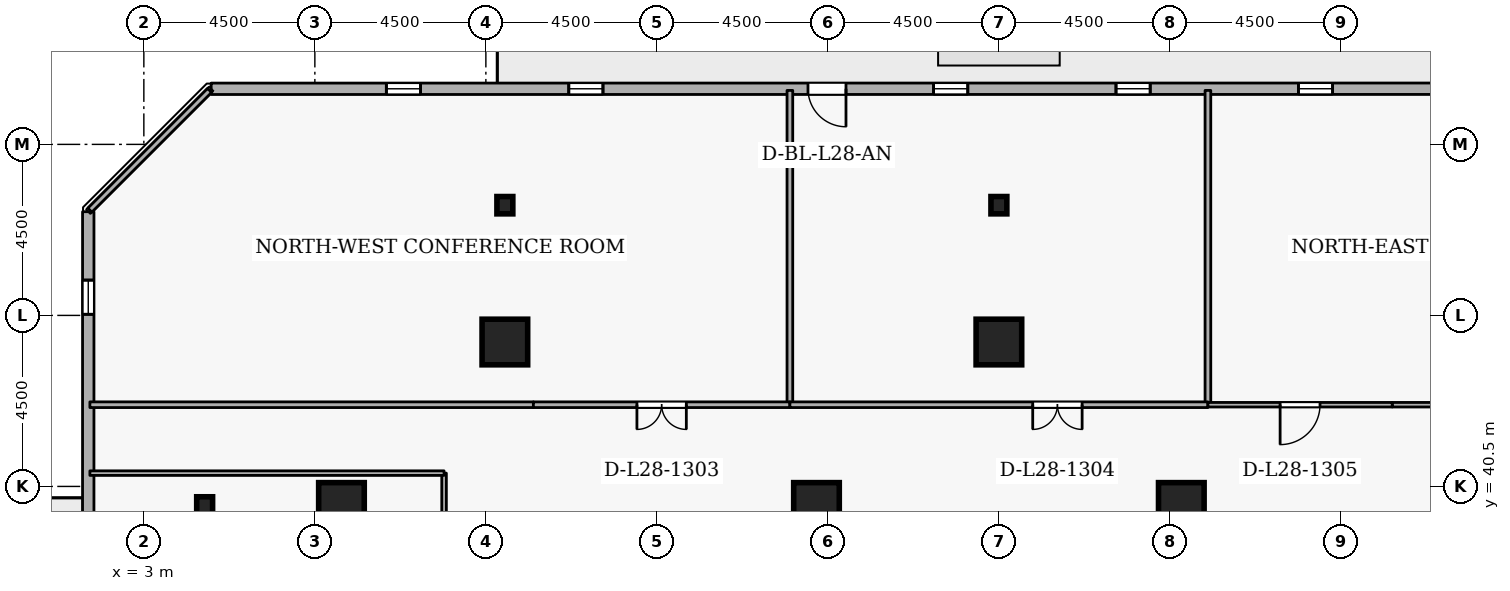
"""IFC4 building model, lengths in metres.
Left out: names, types, materials, properties, quantities, classifications, styles, units other than length and angle.
Written with IfcOpenShell. Run it as: python <this file> out.ifc"""

import sys

from ifc_helpers import new_model, si_unit, direction, frame, frame_2d, origin, origin_2d, place, context, subcontext, project, spatial, rectangle, i_section, extrude, element, fill, save


model = new_model("IFC4")
c1 = context("Model", 3, precision=1e-05, world=origin(), true_north=direction((0.0, 1.0)))
c2 = subcontext(c1, "Body", "Model", "MODEL_VIEW")
j1 = project(units=[si_unit("LENGTHUNIT", "METRE"), si_unit("PLANEANGLEUNIT", "RADIAN")], contexts=[c1])
p1 = place(None, origin())
s1 = spatial("IfcSite", under=j1, at=p1, CompositionType="ELEMENT")
p2 = place(p1, origin())
s2 = spatial("IfcBuilding", under=s1, at=p2, CompositionType="ELEMENT")
p3 = place(p2, frame((0.0, 0.0, 108.9)))
s3 = spatial("IfcBuildingStorey", under=s2, at=p3, CompositionType="ELEMENT", Elevation=108.9)
for number, where, z_axis, x_axis in (
    (1, (12.5, 44.3, 0.0), (0.0, 0.0, 1.0), (1.0, 0.0, 0.0)),
    (2, (25.5, 44.3, 0.0), (0.0, 0.0, 1.0), (1.0, 0.0, 0.0)),
    (3, (8.2, 40.0, 0.0), (0.0, 0.0, 1.0), (1.0, 0.0, 0.0)),
    (4, (20.7, 40.0, 0.0), (0.0, 0.0, 1.0), (1.0, 0.0, 0.0)),
    (5, (30.3, 40.0, 0.0), (0.0, 0.0, 1.0), (1.0, 0.0, 0.0)),
):
    element("IfcColumn", number, at=place(p3, frame(where, z_axis=z_axis, x_axis=x_axis)), inside=s3, PredefinedType="COLUMN", context=c2, shape_type="SweptSolid", body=[
        extrude(rectangle(XDim=1.2, YDim=1.2, at=origin_2d()), origin(), (0.0, 0.0, 1.0), 3.6),
    ])
for number, where, z_axis, x_axis in (
    (6, (12.5, 47.9, 0.0), (0.0, 0.0, 1.0), (1.0, 0.0, 0.0)),
    (7, (25.5, 47.9, 0.0), (0.0, 0.0, 1.0), (1.0, 0.0, 0.0)),
    (8, (4.6, 40.0, 0.0), (0.0, 0.0, 1.0), (1.0, 0.0, 0.0)),
):
    element("IfcColumn", number, at=place(p3, frame(where, z_axis=z_axis, x_axis=x_axis)), inside=s3, PredefinedType="COLUMN", context=c2, shape_type="SweptSolid", body=[
        extrude(i_section(OverallWidth=0.418, OverallDepth=0.456, WebThickness=0.042, FlangeThickness=0.067, FilletRadius=0.015, at=origin_2d()), origin(), (0.0, 0.0, 1.0), 3.6),
    ])
p4 = place(p3, frame((40.881, 50.965, 0.0), z_axis=(0.0, 0.0, 1.0), x_axis=(-0.999999998537, -5.4088042e-05, 0.0)))
e9 = element("IfcWall", 9, at=p4, inside=s3, PredefinedType="STANDARD", context=c2, shape_type="SweptSolid", body=[
    extrude(rectangle(XDim=36.11, YDim=0.3, at=frame_2d((18.055, 0.0))), origin(), (0.0, 0.0, 1.0), 2.7),
])
p5 = place(p4, frame((19.405, 0.0, 0.0)))
e10 = element("IfcOpeningElement", 10, at=p5, cuts=e9, PredefinedType="OPENING", context=c2, shape_type="SweptSolid", body=[
    extrude(rectangle(XDim=1.0, YDim=2.08, at=frame_2d((0.5, 1.04))), frame((0.0, 0.16, 0.0), z_axis=(0.0, -1.0, 0.0), x_axis=(1.0, 0.0, 0.0)), (0.0, 0.0, 1.0), 0.32),
])
p6 = place(p4, frame((1.8, 0.0, 0.72)))
e11 = element("IfcOpeningElement", 11, at=p6, cuts=e9, PredefinedType="OPENING", context=c2, shape_type="SweptSolid", body=[
    extrude(rectangle(XDim=0.9, YDim=1.75, at=frame_2d((0.45, 0.875))), frame((0.0, 0.16, 0.0), z_axis=(0.0, -1.0, 0.0), x_axis=(1.0, 0.0, 0.0)), (0.0, 0.0, 1.0), 0.32),
])
p7 = place(p4, frame((6.6, 0.0, 0.72)))
e12 = element("IfcOpeningElement", 12, at=p7, cuts=e9, PredefinedType="OPENING", context=c2, shape_type="SweptSolid", body=[
    extrude(rectangle(XDim=0.9, YDim=1.75, at=frame_2d((0.45, 0.875))), frame((0.0, 0.16, 0.0), z_axis=(0.0, -1.0, 0.0), x_axis=(1.0, 0.0, 0.0)), (0.0, 0.0, 1.0), 0.32),
])
p8 = place(p4, frame((11.4, 0.0, 0.72)))
e13 = element("IfcOpeningElement", 13, at=p8, cuts=e9, PredefinedType="OPENING", context=c2, shape_type="SweptSolid", body=[
    extrude(rectangle(XDim=0.9, YDim=1.75, at=frame_2d((0.45, 0.875))), frame((0.0, 0.16, 0.0), z_axis=(0.0, -1.0, 0.0), x_axis=(1.0, 0.0, 0.0)), (0.0, 0.0, 1.0), 0.32),
])
p9 = place(p4, frame((16.2, 0.0, 0.72)))
e14 = element("IfcOpeningElement", 14, at=p9, cuts=e9, PredefinedType="OPENING", context=c2, shape_type="SweptSolid", body=[
    extrude(rectangle(XDim=0.9, YDim=1.75, at=frame_2d((0.45, 0.875))), frame((0.0, 0.16, 0.0), z_axis=(0.0, -1.0, 0.0), x_axis=(1.0, 0.0, 0.0)), (0.0, 0.0, 1.0), 0.32),
])
p10 = place(p4, frame((25.8, 0.0, 0.72)))
e15 = element("IfcOpeningElement", 15, at=p10, cuts=e9, PredefinedType="OPENING", context=c2, shape_type="SweptSolid", body=[
    extrude(rectangle(XDim=0.9, YDim=1.75, at=frame_2d((0.45, 0.875))), frame((0.0, 0.16, 0.0), z_axis=(0.0, -1.0, 0.0), x_axis=(1.0, 0.0, 0.0)), (0.0, 0.0, 1.0), 0.32),
])
p11 = place(p4, frame((30.6, 0.0, 0.72)))
e16 = element("IfcOpeningElement", 16, at=p11, cuts=e9, PredefinedType="OPENING", context=c2, shape_type="SweptSolid", body=[
    extrude(rectangle(XDim=0.9, YDim=1.75, at=frame_2d((0.45, 0.875))), frame((0.0, 0.16, 0.0), z_axis=(0.0, -1.0, 0.0), x_axis=(1.0, 0.0, 0.0)), (0.0, 0.0, 1.0), 0.32),
])
p12 = place(p3, frame((1.537, 47.729, 0.0), z_axis=(0.0, 0.0, 1.0), x_axis=(-5.4088042e-05, -0.999999998537, 0.0)))
e17 = element("IfcWall", 17, at=p12, inside=s3, PredefinedType="STANDARD", context=c2, shape_type="SweptSolid", body=[
    extrude(rectangle(XDim=36.11, YDim=0.3, at=frame_2d((18.055, 0.0))), origin(), (0.0, 0.0, 1.0), 2.7),
])
p13 = place(p12, frame((19.405, 0.0, 0.0)))
e18 = element("IfcOpeningElement", 18, at=p13, cuts=e17, PredefinedType="OPENING", context=c2, shape_type="SweptSolid", body=[
    extrude(rectangle(XDim=1.0, YDim=2.08, at=frame_2d((0.5, 1.04))), frame((0.0, 0.16, 0.0), z_axis=(0.0, -1.0, 0.0), x_axis=(1.0, 0.0, 0.0)), (0.0, 0.0, 1.0), 0.32),
])
p14 = place(p12, frame((1.8, 0.0, 0.72)))
e19 = element("IfcOpeningElement", 19, at=p14, cuts=e17, PredefinedType="OPENING", context=c2, shape_type="SweptSolid", body=[
    extrude(rectangle(XDim=0.9, YDim=1.75, at=frame_2d((0.45, 0.875))), frame((0.0, 0.16, 0.0), z_axis=(0.0, -1.0, 0.0), x_axis=(1.0, 0.0, 0.0)), (0.0, 0.0, 1.0), 0.32),
])
p15 = place(p12, frame((11.4, 0.0, 0.72)))
e20 = element("IfcOpeningElement", 20, at=p15, cuts=e17, PredefinedType="OPENING", context=c2, shape_type="SweptSolid", body=[
    extrude(rectangle(XDim=0.9, YDim=1.75, at=frame_2d((0.45, 0.875))), frame((0.0, 0.16, 0.0), z_axis=(0.0, -1.0, 0.0), x_axis=(1.0, 0.0, 0.0)), (0.0, 0.0, 1.0), 0.32),
])
p16 = place(p12, frame((16.2, 0.0, 0.72)))
e21 = element("IfcOpeningElement", 21, at=p16, cuts=e17, PredefinedType="OPENING", context=c2, shape_type="SweptSolid", body=[
    extrude(rectangle(XDim=0.9, YDim=1.75, at=frame_2d((0.45, 0.875))), frame((0.0, 0.16, 0.0), z_axis=(0.0, -1.0, 0.0), x_axis=(1.0, 0.0, 0.0)), (0.0, 0.0, 1.0), 0.32),
])
p17 = place(p12, frame((25.8, 0.0, 0.72)))
e22 = element("IfcOpeningElement", 22, at=p17, cuts=e17, PredefinedType="OPENING", context=c2, shape_type="SweptSolid", body=[
    extrude(rectangle(XDim=0.9, YDim=1.75, at=frame_2d((0.45, 0.875))), frame((0.0, 0.16, 0.0), z_axis=(0.0, -1.0, 0.0), x_axis=(1.0, 0.0, 0.0)), (0.0, 0.0, 1.0), 0.32),
])
p18 = place(p12, frame((30.6, 0.0, 0.72)))
e23 = element("IfcOpeningElement", 23, at=p18, cuts=e17, PredefinedType="OPENING", context=c2, shape_type="SweptSolid", body=[
    extrude(rectangle(XDim=0.9, YDim=1.75, at=frame_2d((0.45, 0.875))), frame((0.0, 0.16, 0.0), z_axis=(0.0, -1.0, 0.0), x_axis=(1.0, 0.0, 0.0)), (0.0, 0.0, 1.0), 0.32),
])
p19 = place(p3, frame((10.9, 40.85, 0.0), z_axis=(0.0, 0.0, 1.0), x_axis=(0.0, -1.0, 0.0)))
e24 = element("IfcWall", 24, at=p19, inside=s3, PredefinedType="PARTITIONING", context=c2, shape_type="SweptSolid", body=[
    extrude(rectangle(XDim=4.912, YDim=0.12, at=frame_2d((2.456, 0.0))), origin(), (0.0, 0.0, 1.0), 3.34),
])
p20 = place(p3, frame((1.58, 40.85, 0.0), z_axis=(0.0, 0.0, 1.0), x_axis=(1.0, 0.0, 0.0)))
e25 = element("IfcWall", 25, at=p20, inside=s3, PredefinedType="PARTITIONING", context=c2, shape_type="SweptSolid", body=[
    extrude(rectangle(XDim=9.32, YDim=0.12, at=frame_2d((4.66, 0.0))), origin(), (0.0, 0.0, 1.0), 3.34),
])
p21 = place(p3, frame((13.25, 42.65, 0.0), z_axis=(0.0, 0.0, 1.0), x_axis=(-1.0, 0.0, 0.0)))
e26 = element("IfcWall", 26, at=p21, inside=s3, PredefinedType="PARTITIONING", context=c2, shape_type="SweptSolid", body=[
    extrude(rectangle(XDim=11.67, YDim=0.15, at=frame_2d((5.835, 0.0))), origin(), (0.0, 0.0, 1.0), 3.34),
])
p22 = place(p3, frame((1.58, 47.771, 0.0), z_axis=(0.0, 0.0, 1.0), x_axis=(0.707106781187, 0.707106781187, 0.0)))
e27 = element("IfcWall", 27, at=p22, inside=s3, PredefinedType="PARTITIONING", context=c2, shape_type="SweptSolid", body=[
    extrude(rectangle(XDim=4.454, YDim=0.15, at=frame_2d((2.227, 0.0))), origin(), (0.0, 0.0, 1.0), 3.34),
])
p23 = place(p3, frame((20.0, 50.92, 0.0), z_axis=(0.0, 0.0, 1.0), x_axis=(0.0, -1.0, 0.0)))
e28 = element("IfcWall", 28, at=p23, inside=s3, PredefinedType="PARTITIONING", context=c2, shape_type="SweptSolid", body=[
    extrude(rectangle(XDim=8.27, YDim=0.15, at=frame_2d((4.135, 0.0))), origin(), (0.0, 0.0, 1.0), 3.34),
])
p24 = place(p3, frame((20.0, 42.65, 0.0), z_axis=(0.0, 0.0, 1.0), x_axis=(-1.0, 0.0, 0.0)))
e29 = element("IfcWall", 29, at=p24, inside=s3, PredefinedType="PARTITIONING", context=c2, shape_type="SweptSolid", body=[
    extrude(rectangle(XDim=6.75, YDim=0.15, at=frame_2d((3.375, 0.0))), origin(), (0.0, 0.0, 1.0), 3.34),
])
p25 = place(p24, frame((2.725, 0.0, 0.0)))
e30 = element("IfcOpeningElement", 30, at=p25, cuts=e29, PredefinedType="OPENING", context=c2, shape_type="SweptSolid", body=[
    extrude(rectangle(XDim=1.3, YDim=2.12, at=frame_2d((0.65, 1.06))), frame((0.0, 0.085, 0.0), z_axis=(0.0, -1.0, 0.0), x_axis=(1.0, 0.0, 0.0)), (0.0, 0.0, 1.0), 0.17),
])
p26 = place(p3, frame((31.0, 50.92, 0.0), z_axis=(0.0, 0.0, 1.0), x_axis=(0.0, -1.0, 0.0)))
e31 = element("IfcWall", 31, at=p26, inside=s3, PredefinedType="PARTITIONING", context=c2, shape_type="SweptSolid", body=[
    extrude(rectangle(XDim=8.27, YDim=0.15, at=frame_2d((4.135, 0.0))), origin(), (0.0, 0.0, 1.0), 3.34),
])
p27 = place(p3, frame((31.0, 42.65, 0.0), z_axis=(0.0, 0.0, 1.0), x_axis=(-1.0, 0.0, 0.0)))
e32 = element("IfcWall", 32, at=p27, inside=s3, PredefinedType="PARTITIONING", context=c2, shape_type="SweptSolid", body=[
    extrude(rectangle(XDim=11.0, YDim=0.15, at=frame_2d((5.5, 0.0))), origin(), (0.0, 0.0, 1.0), 3.34),
])
p28 = place(p27, frame((3.31, 0.0, 0.0)))
e33 = element("IfcOpeningElement", 33, at=p28, cuts=e32, PredefinedType="OPENING", context=c2, shape_type="SweptSolid", body=[
    extrude(rectangle(XDim=1.3, YDim=2.12, at=frame_2d((0.65, 1.06))), frame((0.0, 0.085, 0.0), z_axis=(0.0, -1.0, 0.0), x_axis=(1.0, 0.0, 0.0)), (0.0, 0.0, 1.0), 0.17),
])
p29 = place(p3, frame((37.75, 42.65, 0.0), z_axis=(0.0, 0.0, 1.0), x_axis=(-1.0, 0.0, 0.0)))
e34 = element("IfcWall", 34, at=p29, inside=s3, PredefinedType="PARTITIONING", context=c2, shape_type="SweptSolid", body=[
    extrude(rectangle(XDim=1.9, YDim=0.12, at=frame_2d((0.95, 0.0))), origin(), (0.0, 0.0, 1.0), 3.34),
])
p30 = place(p3, frame((35.85, 42.65, 0.0), z_axis=(0.0, 0.0, 1.0), x_axis=(-1.0, 0.0, 0.0)))
e35 = element("IfcWall", 35, at=p30, inside=s3, PredefinedType="PARTITIONING", context=c2, shape_type="SweptSolid", body=[
    extrude(rectangle(XDim=4.85, YDim=0.12, at=frame_2d((2.425, 0.0))), origin(), (0.0, 0.0, 1.0), 2.895),
])
p31 = place(p30, frame((1.9, 0.0, 0.0)))
e36 = element("IfcOpeningElement", 36, at=p31, cuts=e35, PredefinedType="OPENING", context=c2, shape_type="SweptSolid", body=[
    extrude(rectangle(XDim=1.05, YDim=2.1, at=frame_2d((0.525, 1.05))), frame((0.0, 0.07, 0.0), z_axis=(0.0, -1.0, 0.0), x_axis=(1.0, 0.0, 0.0)), (0.0, 0.0, 1.0), 0.14),
])
p32 = place(p5, origin())
e37 = element("IfcDoor", 37, at=p32, inside=s3, OperationType="SINGLE_SWING_LEFT", PredefinedType="DOOR", context=c2, shape_type="SweptSolid", body=[
    extrude(rectangle(XDim=1.0, YDim=2.08, at=frame_2d((0.5, 1.04))), frame((0.0, 0.025, 0.0), z_axis=(0.0, -1.0, 0.0), x_axis=(1.0, 0.0, 0.0)), (0.0, 0.0, 1.0), 0.05),
])
fill(e10, e37)
p33 = place(p7, origin())
e38 = element("IfcWindow", 38, at=p33, inside=s3, PartitioningType="SINGLE_PANEL", PredefinedType="WINDOW", context=c2, shape_type="SweptSolid", body=[
    extrude(rectangle(XDim=0.9, YDim=1.75, at=frame_2d((0.45, 0.875))), frame((0.0, 0.03, 0.0), z_axis=(0.0, -1.0, 0.0), x_axis=(1.0, 0.0, 0.0)), (0.0, 0.0, 1.0), 0.06),
])
fill(e12, e38)
p34 = place(p8, origin())
e39 = element("IfcWindow", 39, at=p34, inside=s3, PartitioningType="SINGLE_PANEL", PredefinedType="WINDOW", context=c2, shape_type="SweptSolid", body=[
    extrude(rectangle(XDim=0.9, YDim=1.75, at=frame_2d((0.45, 0.875))), frame((0.0, 0.03, 0.0), z_axis=(0.0, -1.0, 0.0), x_axis=(1.0, 0.0, 0.0)), (0.0, 0.0, 1.0), 0.06),
])
fill(e13, e39)
p35 = place(p9, origin())
e40 = element("IfcWindow", 40, at=p35, inside=s3, PartitioningType="SINGLE_PANEL", PredefinedType="WINDOW", context=c2, shape_type="SweptSolid", body=[
    extrude(rectangle(XDim=0.9, YDim=1.75, at=frame_2d((0.45, 0.875))), frame((0.0, 0.03, 0.0), z_axis=(0.0, -1.0, 0.0), x_axis=(1.0, 0.0, 0.0)), (0.0, 0.0, 1.0), 0.06),
])
fill(e14, e40)
p36 = place(p10, origin())
e41 = element("IfcWindow", 41, at=p36, inside=s3, PartitioningType="SINGLE_PANEL", PredefinedType="WINDOW", context=c2, shape_type="SweptSolid", body=[
    extrude(rectangle(XDim=0.9, YDim=1.75, at=frame_2d((0.45, 0.875))), frame((0.0, 0.03, 0.0), z_axis=(0.0, -1.0, 0.0), x_axis=(1.0, 0.0, 0.0)), (0.0, 0.0, 1.0), 0.06),
])
fill(e15, e41)
p37 = place(p11, origin())
e42 = element("IfcWindow", 42, at=p37, inside=s3, PartitioningType="SINGLE_PANEL", PredefinedType="WINDOW", context=c2, shape_type="SweptSolid", body=[
    extrude(rectangle(XDim=0.9, YDim=1.75, at=frame_2d((0.45, 0.875))), frame((0.0, 0.03, 0.0), z_axis=(0.0, -1.0, 0.0), x_axis=(1.0, 0.0, 0.0)), (0.0, 0.0, 1.0), 0.06),
])
fill(e16, e42)
p38 = place(p14, origin())
e43 = element("IfcWindow", 43, at=p38, inside=s3, PartitioningType="SINGLE_PANEL", PredefinedType="WINDOW", context=c2, shape_type="SweptSolid", body=[
    extrude(rectangle(XDim=0.9, YDim=1.75, at=frame_2d((0.45, 0.875))), frame((0.0, 0.03, 0.0), z_axis=(0.0, -1.0, 0.0), x_axis=(1.0, 0.0, 0.0)), (0.0, 0.0, 1.0), 0.06),
])
fill(e19, e43)
p39 = place(p25, origin())
e44 = element("IfcDoor", 44, at=p39, inside=s3, OperationType="DOUBLE_DOOR_SINGLE_SWING", PredefinedType="DOOR", context=c2, shape_type="SweptSolid", body=[
    extrude(rectangle(XDim=1.3, YDim=2.12, at=frame_2d((0.65, 1.06))), frame((0.0, 0.025, 0.0), z_axis=(0.0, -1.0, 0.0), x_axis=(1.0, 0.0, 0.0)), (0.0, 0.0, 1.0), 0.05),
])
fill(e30, e44)
p40 = place(p28, origin())
e45 = element("IfcDoor", 45, at=p40, inside=s3, OperationType="DOUBLE_DOOR_SINGLE_SWING", PredefinedType="DOOR", context=c2, shape_type="SweptSolid", body=[
    extrude(rectangle(XDim=1.3, YDim=2.12, at=frame_2d((0.65, 1.06))), frame((0.0, 0.025, 0.0), z_axis=(0.0, -1.0, 0.0), x_axis=(1.0, 0.0, 0.0)), (0.0, 0.0, 1.0), 0.05),
])
fill(e33, e45)
p41 = place(p31, origin())
e46 = element("IfcDoor", 46, at=p41, inside=s3, OperationType="SINGLE_SWING_RIGHT", PredefinedType="DOOR", context=c2, shape_type="SweptSolid", body=[
    extrude(rectangle(XDim=1.05, YDim=2.1, at=frame_2d((0.525, 1.05))), frame((0.0, 0.025, 0.0), z_axis=(0.0, -1.0, 0.0), x_axis=(1.0, 0.0, 0.0)), (0.0, 0.0, 1.0), 0.05),
])
fill(e36, e46)
save(model, sys.argv[1])
